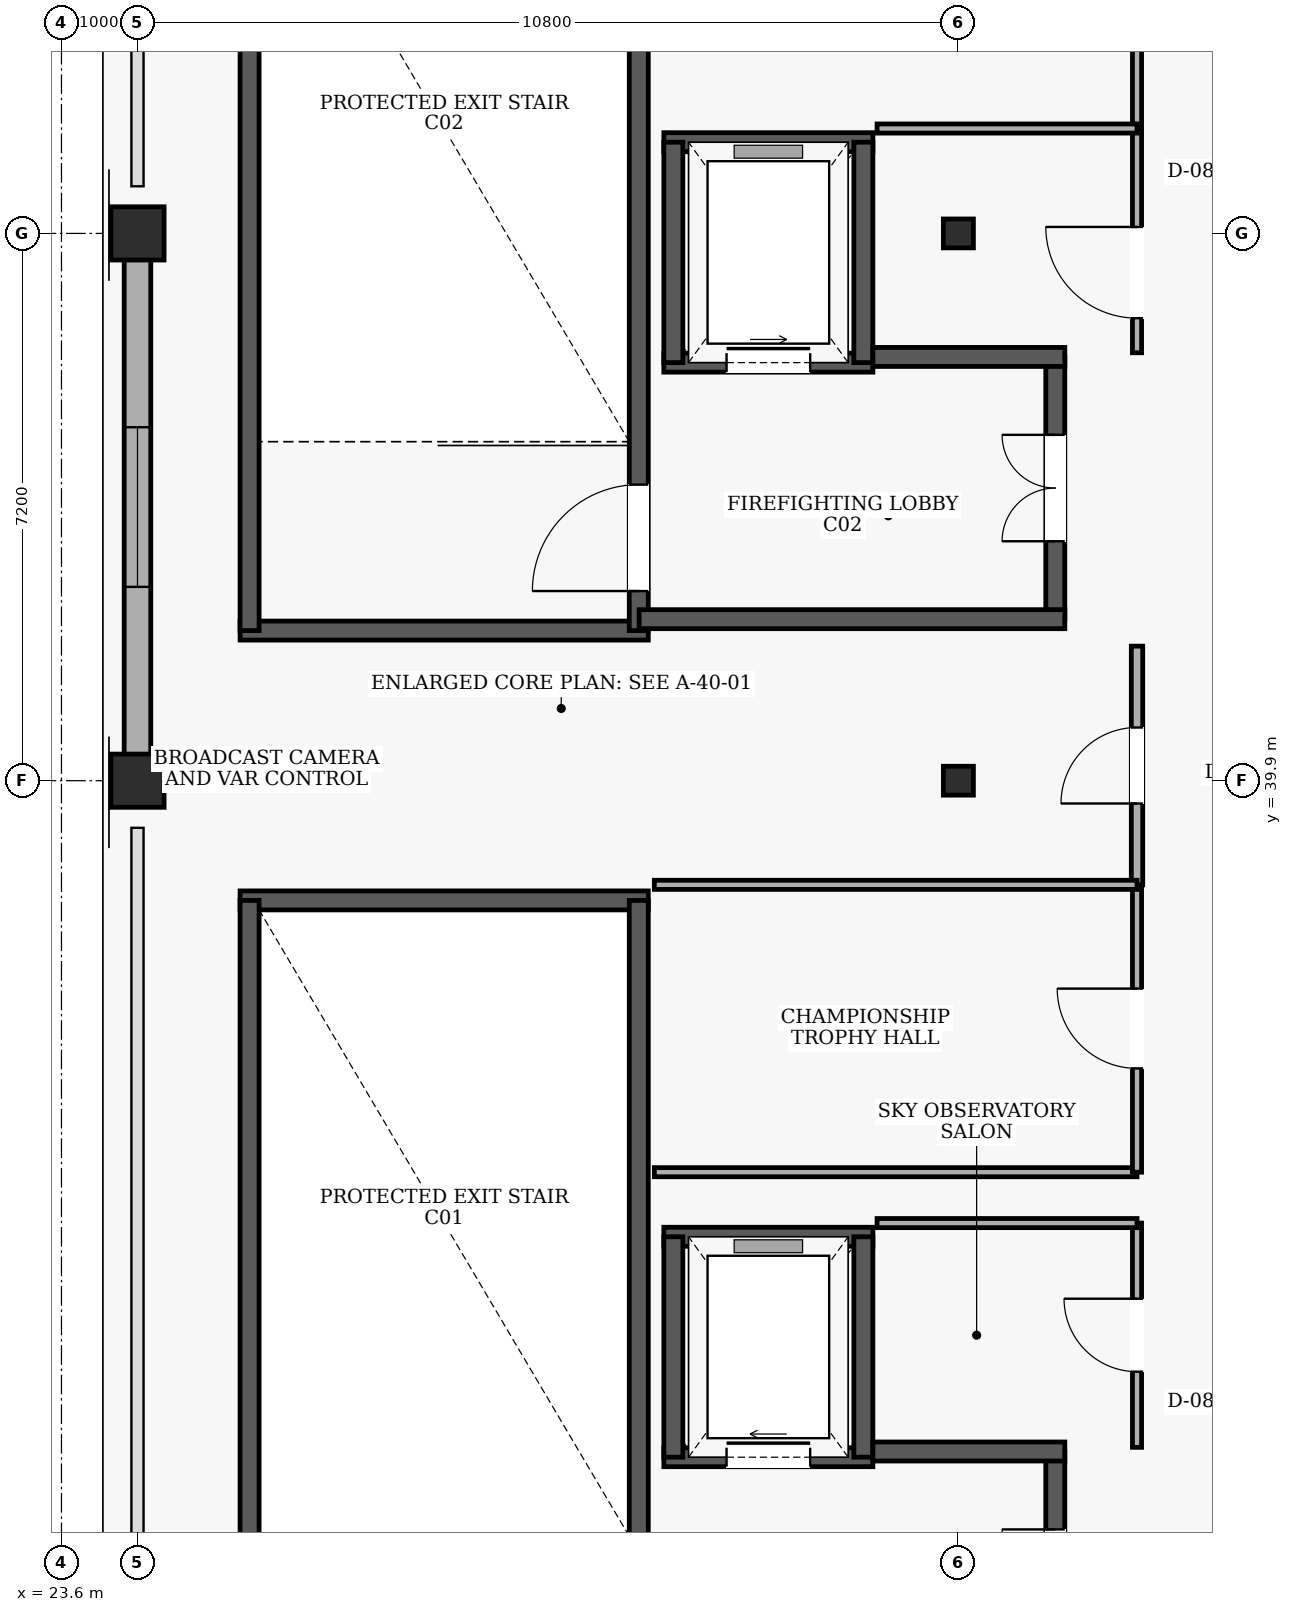
"""IFC4 building model, lengths in metres.
Left out: names, types, materials, properties, quantities, classifications, styles, units other than length and angle.
Written with IfcOpenShell. Run it as: python <this file> out.ifc"""

import sys

from ifc_helpers import new_model, si_unit, direction, frame, frame_2d, origin, origin_2d, place, context, subcontext, project, spatial, rectangle, i_section, extrude, element, fill, save


model = new_model("IFC4")
c1 = context("Model", 3, precision=1e-05, world=origin(), true_north=direction((0.0, 1.0)))
c2 = subcontext(c1, "Body", "Model", "MODEL_VIEW")
j1 = project(units=[si_unit("LENGTHUNIT", "METRE"), si_unit("PLANEANGLEUNIT", "RADIAN")], contexts=[c1])
p1 = place(None, origin())
s1 = spatial("IfcSite", under=j1, at=p1, CompositionType="ELEMENT")
p2 = place(p1, origin())
s2 = spatial("IfcBuilding", under=s1, at=p2, CompositionType="ELEMENT")
p3 = place(p2, frame((0.0, 0.0, 29.4)))
s3 = spatial("IfcBuildingStorey", under=s2, at=p3, CompositionType="ELEMENT", Elevation=29.4)
for number, where, z_axis, x_axis in (
    (1, (24.6, 39.9, 0.0), (0.0, 0.0, 1.0), (1.0, 0.0, 0.0)),
    (2, (24.6, 47.1, 0.0), (0.0, 0.0, 1.0), (1.0, 0.0, 0.0)),
):
    element("IfcColumn", number, at=place(p3, frame(where, z_axis=z_axis, x_axis=x_axis)), inside=s3, PredefinedType="COLUMN", context=c2, shape_type="SweptSolid", body=[
        extrude(rectangle(XDim=0.7, YDim=0.7, at=origin_2d()), origin(), (0.0, 0.0, 1.0), 4.8),
    ])
for number, where, z_axis, x_axis in (
    (3, (35.4, 39.9, 0.0), (0.0, 0.0, 1.0), (1.0, 0.0, 0.0)),
    (4, (35.4, 47.1, 0.0), (0.0, 0.0, 1.0), (1.0, 0.0, 0.0)),
):
    element("IfcColumn", number, at=place(p3, frame(where, z_axis=z_axis, x_axis=x_axis)), inside=s3, PredefinedType="COLUMN", context=c2, shape_type="SweptSolid", body=[
        extrude(i_section(OverallWidth=0.395, OverallDepth=0.38, WebThickness=0.019, FlangeThickness=0.03, at=origin_2d()), origin(), (0.0, 0.0, 1.0), 4.8),
    ])
p4 = place(p3, frame((24.6, 40.245, 0.0), z_axis=(0.0, 0.0, 1.0), x_axis=(0.0, 1.0, 0.0)))
e5 = element("IfcWall", 5, at=p4, inside=s3, PredefinedType="SOLIDWALL", context=c2, shape_type="SweptSolid", body=[
    extrude(rectangle(XDim=6.51, YDim=0.35, at=frame_2d((3.255, 0.0))), origin(), (0.0, 0.0, 1.0), 3.68),
])
p5 = place(p4, frame((2.205, 0.0, 0.9)))
e6 = element("IfcOpeningElement", 6, at=p5, cuts=e5, PredefinedType="OPENING", context=c2, shape_type="SweptSolid", body=[
    extrude(rectangle(XDim=2.1, YDim=1.8, at=frame_2d((1.05, 0.9))), frame((0.0, 0.185, 0.0), z_axis=(0.0, -1.0, 0.0), x_axis=(1.0, 0.0, 0.0)), (0.0, 0.0, 1.0), 0.37),
])
p6 = place(p3, frame((31.32, 38.325, 0.0), z_axis=(0.0, 0.0, 1.0), x_axis=(-1.0, 0.0, 0.0)))
e7 = element("IfcWall", 7, at=p6, inside=s3, PredefinedType="SHEAR", context=c2, shape_type="SweptSolid", body=[
    extrude(rectangle(XDim=5.37, YDim=0.25, at=frame_2d((2.685, 0.0))), origin(), (0.0, 0.0, 1.0), 4.5),
])
p7 = place(p3, frame((26.075, 27.475, 0.0), z_axis=(0.0, 0.0, 1.0), x_axis=(0.0, 1.0, 0.0)))
e8 = element("IfcWall", 8, at=p7, inside=s3, PredefinedType="SHEAR", context=c2, shape_type="SweptSolid", body=[
    extrude(rectangle(XDim=10.85, YDim=0.25, at=frame_2d((5.425, 0.0))), origin(), (0.0, 0.0, 1.0), 4.5),
])
p8 = place(p3, frame((31.195, 27.475, 0.0), z_axis=(0.0, 0.0, 1.0), x_axis=(0.0, 1.0, 0.0)))
e9 = element("IfcWall", 9, at=p8, inside=s3, PredefinedType="SHEAR", context=c2, shape_type="SweptSolid", body=[
    extrude(rectangle(XDim=10.85, YDim=0.25, at=frame_2d((5.425, 0.0))), origin(), (0.0, 0.0, 1.0), 4.5),
])
p9 = place(p8, frame((0.52, 0.0, 0.0)))
e10 = element("IfcOpeningElement", 10, at=p9, cuts=e9, PredefinedType="OPENING", context=c2, shape_type="SweptSolid", body=[
    extrude(rectangle(XDim=1.4, YDim=2.15, at=frame_2d((0.7, 1.075))), frame((0.0, 0.135, 0.0), z_axis=(0.0, -1.0, 0.0), x_axis=(1.0, 0.0, 0.0)), (0.0, 0.0, 1.0), 0.27),
])
p10 = place(p3, frame((25.95, 41.875, 0.0), z_axis=(0.0, 0.0, 1.0), x_axis=(1.0, 0.0, 0.0)))
e11 = element("IfcWall", 11, at=p10, inside=s3, PredefinedType="SHEAR", context=c2, shape_type="SweptSolid", body=[
    extrude(rectangle(XDim=5.37, YDim=0.25, at=frame_2d((2.685, 0.0))), origin(), (0.0, 0.0, 1.0), 4.5),
])
p11 = place(p3, frame((26.075, 41.875, 0.0), z_axis=(0.0, 0.0, 1.0), x_axis=(0.0, 1.0, 0.0)))
e12 = element("IfcWall", 12, at=p11, inside=s3, PredefinedType="SHEAR", context=c2, shape_type="SweptSolid", body=[
    extrude(rectangle(XDim=10.85, YDim=0.25, at=frame_2d((5.425, 0.0))), origin(), (0.0, 0.0, 1.0), 4.5),
])
p12 = place(p3, frame((31.195, 41.875, 0.0), z_axis=(0.0, 0.0, 1.0), x_axis=(0.0, 1.0, 0.0)))
e13 = element("IfcWall", 13, at=p12, inside=s3, PredefinedType="SHEAR", context=c2, shape_type="SweptSolid", body=[
    extrude(rectangle(XDim=10.85, YDim=0.25, at=frame_2d((5.425, 0.0))), origin(), (0.0, 0.0, 1.0), 4.5),
])
p13 = place(p12, frame((0.52, 0.0, 0.0)))
e14 = element("IfcOpeningElement", 14, at=p13, cuts=e13, PredefinedType="OPENING", context=c2, shape_type="SweptSolid", body=[
    extrude(rectangle(XDim=1.4, YDim=2.15, at=frame_2d((0.7, 1.075))), frame((0.0, 0.135, 0.0), z_axis=(0.0, -1.0, 0.0), x_axis=(1.0, 0.0, 0.0)), (0.0, 0.0, 1.0), 0.27),
])
p14 = place(p3, frame((31.525, 31.0, 0.0), z_axis=(0.0, 0.0, 1.0), x_axis=(1.0, 0.0, 0.0)))
e15 = element("IfcWall", 15, at=p14, inside=s3, PredefinedType="SHEAR", context=c2, shape_type="SweptSolid", body=[
    extrude(rectangle(XDim=2.75, YDim=0.25, at=frame_2d((1.375, 0.0))), origin(), (0.0, 0.0, 1.0), 4.5),
])
p15 = place(p14, frame((0.825, 0.0, 0.0)))
e16 = element("IfcOpeningElement", 16, at=p15, cuts=e15, PredefinedType="OPENING", context=c2, shape_type="SweptSolid", body=[
    extrude(rectangle(XDim=1.1, YDim=2.15, at=frame_2d((0.55, 1.075))), frame((0.0, 0.135, 0.0), z_axis=(0.0, -1.0, 0.0), x_axis=(1.0, 0.0, 0.0)), (0.0, 0.0, 1.0), 0.27),
])
p16 = place(p3, frame((34.275, 33.9, 0.0), z_axis=(0.0, 0.0, 1.0), x_axis=(-1.0, 0.0, 0.0)))
e17 = element("IfcWall", 17, at=p16, inside=s3, PredefinedType="SHEAR", context=c2, shape_type="SweptSolid", body=[
    extrude(rectangle(XDim=2.75, YDim=0.25, at=frame_2d((1.375, 0.0))), origin(), (0.0, 0.0, 1.0), 4.5),
])
for number, where, z_axis, x_axis in (
    (18, (31.65, 33.9, 0.0), (0.0, 0.0, 1.0), (0.0, -1.0, 0.0)),
    (19, (34.15, 31.0, 0.0), (0.0, 0.0, 1.0), (0.0, 1.0, 0.0)),
):
    element("IfcWall", number, at=place(p3, frame(where, z_axis=z_axis, x_axis=x_axis)), inside=s3, PredefinedType="SHEAR", context=c2, shape_type="SweptSolid", body=[
        extrude(rectangle(XDim=2.9, YDim=0.25, at=frame_2d((1.45, 0.0))), origin(), (0.0, 0.0, 1.0), 4.5),
    ])
p17 = place(p3, frame((36.675, 27.625, 0.0), z_axis=(0.0, 0.0, 1.0), x_axis=(0.0, 1.0, 0.0)))
e20 = element("IfcWall", 20, at=p17, inside=s3, PredefinedType="SHEAR", context=c2, shape_type="SweptSolid", body=[
    extrude(rectangle(XDim=3.45, YDim=0.25, at=frame_2d((1.725, 0.0))), origin(), (0.0, 0.0, 1.0), 4.5),
])
p18 = place(p17, frame((1.025, 0.0, 0.0)))
e21 = element("IfcOpeningElement", 21, at=p18, cuts=e20, PredefinedType="OPENING", context=c2, shape_type="SweptSolid", body=[
    extrude(rectangle(XDim=1.4, YDim=2.15, at=frame_2d((0.7, 1.075))), frame((0.0, 0.135, 0.0), z_axis=(0.0, -1.0, 0.0), x_axis=(1.0, 0.0, 0.0)), (0.0, 0.0, 1.0), 0.27),
])
p19 = place(p3, frame((34.275, 31.075, 0.0), z_axis=(0.0, 0.0, 1.0), x_axis=(1.0, 0.0, 0.0)))
e22 = element("IfcWall", 22, at=p19, inside=s3, PredefinedType="SHEAR", context=c2, shape_type="SweptSolid", body=[
    extrude(rectangle(XDim=2.525, YDim=0.25, at=frame_2d((1.263, 0.0))), origin(), (0.0, 0.0, 1.0), 4.5),
])
p20 = place(p3, frame((31.525, 45.4, 0.0), z_axis=(0.0, 0.0, 1.0), x_axis=(1.0, 0.0, 0.0)))
e23 = element("IfcWall", 23, at=p20, inside=s3, PredefinedType="SHEAR", context=c2, shape_type="SweptSolid", body=[
    extrude(rectangle(XDim=2.75, YDim=0.25, at=frame_2d((1.375, 0.0))), origin(), (0.0, 0.0, 1.0), 4.5),
])
p21 = place(p20, frame((0.825, 0.0, 0.0)))
e24 = element("IfcOpeningElement", 24, at=p21, cuts=e23, PredefinedType="OPENING", context=c2, shape_type="SweptSolid", body=[
    extrude(rectangle(XDim=1.1, YDim=2.15, at=frame_2d((0.55, 1.075))), frame((0.0, 0.135, 0.0), z_axis=(0.0, -1.0, 0.0), x_axis=(1.0, 0.0, 0.0)), (0.0, 0.0, 1.0), 0.27),
])
p22 = place(p3, frame((34.275, 48.3, 0.0), z_axis=(0.0, 0.0, 1.0), x_axis=(-1.0, 0.0, 0.0)))
e25 = element("IfcWall", 25, at=p22, inside=s3, PredefinedType="SHEAR", context=c2, shape_type="SweptSolid", body=[
    extrude(rectangle(XDim=2.75, YDim=0.25, at=frame_2d((1.375, 0.0))), origin(), (0.0, 0.0, 1.0), 4.5),
])
for number, where, z_axis, x_axis in (
    (26, (31.65, 48.3, 0.0), (0.0, 0.0, 1.0), (0.0, -1.0, 0.0)),
    (27, (34.15, 45.4, 0.0), (0.0, 0.0, 1.0), (0.0, 1.0, 0.0)),
):
    element("IfcWall", number, at=place(p3, frame(where, z_axis=z_axis, x_axis=x_axis)), inside=s3, PredefinedType="SHEAR", context=c2, shape_type="SweptSolid", body=[
        extrude(rectangle(XDim=2.9, YDim=0.25, at=frame_2d((1.45, 0.0))), origin(), (0.0, 0.0, 1.0), 4.5),
    ])
p23 = place(p3, frame((36.675, 42.025, 0.0), z_axis=(0.0, 0.0, 1.0), x_axis=(0.0, 1.0, 0.0)))
e28 = element("IfcWall", 28, at=p23, inside=s3, PredefinedType="SHEAR", context=c2, shape_type="SweptSolid", body=[
    extrude(rectangle(XDim=3.45, YDim=0.25, at=frame_2d((1.725, 0.0))), origin(), (0.0, 0.0, 1.0), 4.5),
])
p24 = place(p23, frame((1.025, 0.0, 0.0)))
e29 = element("IfcOpeningElement", 29, at=p24, cuts=e28, PredefinedType="OPENING", context=c2, shape_type="SweptSolid", body=[
    extrude(rectangle(XDim=1.4, YDim=2.15, at=frame_2d((0.7, 1.075))), frame((0.0, 0.135, 0.0), z_axis=(0.0, -1.0, 0.0), x_axis=(1.0, 0.0, 0.0)), (0.0, 0.0, 1.0), 0.27),
])
p25 = place(p3, frame((34.275, 45.475, 0.0), z_axis=(0.0, 0.0, 1.0), x_axis=(1.0, 0.0, 0.0)))
e30 = element("IfcWall", 30, at=p25, inside=s3, PredefinedType="SHEAR", context=c2, shape_type="SweptSolid", body=[
    extrude(rectangle(XDim=2.525, YDim=0.25, at=frame_2d((1.263, 0.0))), origin(), (0.0, 0.0, 1.0), 4.5),
])
p26 = place(p3, frame((31.2, 42.025, 0.0), z_axis=(0.0, 0.0, 1.0), x_axis=(1.0, 0.0, 0.0)))
e31 = element("IfcWall", 31, at=p26, inside=s3, PredefinedType="SHEAR", context=c2, shape_type="SweptSolid", body=[
    extrude(rectangle(XDim=5.6, YDim=0.25, at=frame_2d((2.8, 0.0))), origin(), (0.0, 0.0, 1.0), 4.5),
])
p27 = place(p3, frame((37.75, 31.13, 0.0), z_axis=(0.0, 0.0, 1.0), x_axis=(0.0, 1.0, 0.0)))
e32 = element("IfcWall", 32, at=p27, inside=s3, PredefinedType="PARTITIONING", context=c2, shape_type="SweptSolid", body=[
    extrude(rectangle(XDim=2.95, YDim=0.12, at=frame_2d((1.475, 0.0))), origin(), (0.0, 0.0, 1.0), 4.5),
])
p28 = place(p27, frame((0.995, 0.0, 0.0)))
e33 = element("IfcOpeningElement", 33, at=p28, cuts=e32, PredefinedType="OPENING", context=c2, shape_type="SweptSolid", body=[
    extrude(rectangle(XDim=0.96, YDim=2.1, at=frame_2d((0.48, 1.05))), frame((0.0, 0.07, 0.0), z_axis=(0.0, -1.0, 0.0), x_axis=(1.0, 0.0, 0.0)), (0.0, 0.0, 1.0), 0.14),
])
p29 = place(p3, frame((37.75, 34.08, 0.0), z_axis=(0.0, 0.0, 1.0), x_axis=(-1.0, 0.0, 0.0)))
e34 = element("IfcWall", 34, at=p29, inside=s3, PredefinedType="PARTITIONING", context=c2, shape_type="SweptSolid", body=[
    extrude(rectangle(XDim=3.42, YDim=0.12, at=frame_2d((1.71, 0.0))), origin(), (0.0, 0.0, 1.0), 4.5),
])
p30 = place(p3, frame((37.75, 38.53, 0.0), z_axis=(0.0, 0.0, 1.0), x_axis=(0.0, 1.0, 0.0)))
e35 = element("IfcWall", 35, at=p30, inside=s3, PredefinedType="PARTITIONING", context=c2, shape_type="SweptSolid", body=[
    extrude(rectangle(XDim=3.14, YDim=0.15, at=frame_2d((1.57, 0.0))), origin(), (0.0, 0.0, 1.0), 4.5),
])
p31 = place(p30, frame((1.07, 0.0, 0.0)))
e36 = element("IfcOpeningElement", 36, at=p31, cuts=e35, PredefinedType="OPENING", context=c2, shape_type="SweptSolid", body=[
    extrude(rectangle(XDim=1.0, YDim=2.1, at=frame_2d((0.5, 1.05))), frame((0.0, 0.085, 0.0), z_axis=(0.0, -1.0, 0.0), x_axis=(1.0, 0.0, 0.0)), (0.0, 0.0, 1.0), 0.17),
])
p32 = place(p3, frame((31.4, 34.75, 0.0), z_axis=(0.0, 0.0, 1.0), x_axis=(1.0, 0.0, 0.0)))
e37 = element("IfcWall", 37, at=p32, inside=s3, PredefinedType="PARTITIONING", context=c2, shape_type="SweptSolid", body=[
    extrude(rectangle(XDim=6.35, YDim=0.12, at=frame_2d((3.175, 0.0))), origin(), (0.0, 0.0, 1.0), 4.5),
])
p33 = place(p3, frame((37.75, 34.75, 0.0), z_axis=(0.0, 0.0, 1.0), x_axis=(0.0, 1.0, 0.0)))
e38 = element("IfcWall", 38, at=p33, inside=s3, PredefinedType="PARTITIONING", context=c2, shape_type="SweptSolid", body=[
    extrude(rectangle(XDim=3.781, YDim=0.12, at=frame_2d((1.89, 0.0))), origin(), (0.0, 0.0, 1.0), 4.5),
])
p34 = place(p33, frame((1.365, 0.0, 0.0)))
e39 = element("IfcOpeningElement", 39, at=p34, cuts=e38, PredefinedType="OPENING", context=c2, shape_type="SweptSolid", body=[
    extrude(rectangle(XDim=1.05, YDim=2.15, at=frame_2d((0.525, 1.075))), frame((0.0, 0.07, 0.0), z_axis=(0.0, -1.0, 0.0), x_axis=(1.0, 0.0, 0.0)), (0.0, 0.0, 1.0), 0.14),
])
p35 = place(p3, frame((37.75, 38.53, 0.0), z_axis=(0.0, 0.0, 1.0), x_axis=(-1.0, 0.0, 0.0)))
e40 = element("IfcWall", 40, at=p35, inside=s3, PredefinedType="PARTITIONING", context=c2, shape_type="SweptSolid", body=[
    extrude(rectangle(XDim=6.35, YDim=0.12, at=frame_2d((3.175, 0.0))), origin(), (0.0, 0.0, 1.0), 4.5),
])
p36 = place(p3, frame((37.75, 48.48, 0.0), z_axis=(0.0, 0.0, 1.0), x_axis=(0.0, 1.0, 0.0)))
e41 = element("IfcWall", 41, at=p36, inside=s3, PredefinedType="PARTITIONING", context=c2, shape_type="SweptSolid", body=[
    extrude(rectangle(XDim=4.45, YDim=0.12, at=frame_2d((2.225, 0.0))), origin(), (0.0, 0.0, 1.0), 4.5),
])
p37 = place(p36, frame((1.665, 0.0, 0.0)))
e42 = element("IfcOpeningElement", 42, at=p37, cuts=e41, PredefinedType="OPENING", context=c2, shape_type="SweptSolid", body=[
    extrude(rectangle(XDim=1.12, YDim=2.15, at=frame_2d((0.56, 1.075))), frame((0.0, 0.07, 0.0), z_axis=(0.0, -1.0, 0.0), x_axis=(1.0, 0.0, 0.0)), (0.0, 0.0, 1.0), 0.14),
])
p38 = place(p3, frame((37.75, 45.53, 0.0), z_axis=(0.0, 0.0, 1.0), x_axis=(0.0, 1.0, 0.0)))
e43 = element("IfcWall", 43, at=p38, inside=s3, PredefinedType="PARTITIONING", context=c2, shape_type="SweptSolid", body=[
    extrude(rectangle(XDim=2.95, YDim=0.12, at=frame_2d((1.475, 0.0))), origin(), (0.0, 0.0, 1.0), 4.5),
])
p39 = place(p38, frame((0.455, 0.0, 0.0)))
e44 = element("IfcOpeningElement", 44, at=p39, cuts=e43, PredefinedType="OPENING", context=c2, shape_type="SweptSolid", body=[
    extrude(rectangle(XDim=1.2, YDim=2.15, at=frame_2d((0.6, 1.075))), frame((0.0, 0.07, 0.0), z_axis=(0.0, -1.0, 0.0), x_axis=(1.0, 0.0, 0.0)), (0.0, 0.0, 1.0), 0.14),
])
p40 = place(p3, frame((37.75, 48.48, 0.0), z_axis=(0.0, 0.0, 1.0), x_axis=(-1.0, 0.0, 0.0)))
e45 = element("IfcWall", 45, at=p40, inside=s3, PredefinedType="PARTITIONING", context=c2, shape_type="SweptSolid", body=[
    extrude(rectangle(XDim=3.42, YDim=0.12, at=frame_2d((1.71, 0.0))), origin(), (0.0, 0.0, 1.0), 4.5),
])
p41 = place(p5, origin())
e46 = element("IfcWindow", 46, at=p41, inside=s3, PartitioningType="SINGLE_PANEL", PredefinedType="WINDOW", context=c2, shape_type="SweptSolid", body=[
    extrude(rectangle(XDim=2.1, YDim=1.8, at=frame_2d((1.05, 0.9))), frame((0.0, 0.03, 0.0), z_axis=(0.0, -1.0, 0.0), x_axis=(1.0, 0.0, 0.0)), (0.0, 0.0, 1.0), 0.06),
])
fill(e6, e46)
p42 = place(p13, origin())
e47 = element("IfcDoor", 47, at=p42, inside=s3, OperationType="SINGLE_SWING_LEFT", PredefinedType="DOOR", context=c2, shape_type="SweptSolid", body=[
    extrude(rectangle(XDim=1.4, YDim=2.15, at=frame_2d((0.7, 1.075))), frame((0.0, 0.025, 0.0), z_axis=(0.0, -1.0, 0.0), x_axis=(1.0, 0.0, 0.0)), (0.0, 0.0, 1.0), 0.05),
])
fill(e14, e47)
p43 = place(p15, origin())
e48 = element("IfcDoor", 48, at=p43, inside=s3, OperationType="SLIDING_TO_RIGHT", PredefinedType="DOOR", context=c2, shape_type="SweptSolid", body=[
    extrude(rectangle(XDim=1.1, YDim=2.15, at=frame_2d((0.55, 1.075))), frame((0.0, 0.025, 0.0), z_axis=(0.0, -1.0, 0.0), x_axis=(1.0, 0.0, 0.0)), (0.0, 0.0, 1.0), 0.05),
])
fill(e16, e48)
p44 = place(p18, origin())
e49 = element("IfcDoor", 49, at=p44, inside=s3, OperationType="DOUBLE_DOOR_SINGLE_SWING", PredefinedType="DOOR", context=c2, shape_type="SweptSolid", body=[
    extrude(rectangle(XDim=1.4, YDim=2.15, at=frame_2d((0.7, 1.075))), frame((0.0, 0.025, 0.0), z_axis=(0.0, -1.0, 0.0), x_axis=(1.0, 0.0, 0.0)), (0.0, 0.0, 1.0), 0.05),
])
fill(e21, e49)
p45 = place(p21, origin())
e50 = element("IfcDoor", 50, at=p45, inside=s3, OperationType="SLIDING_TO_LEFT", PredefinedType="DOOR", context=c2, shape_type="SweptSolid", body=[
    extrude(rectangle(XDim=1.1, YDim=2.15, at=frame_2d((0.55, 1.075))), frame((0.0, 0.025, 0.0), z_axis=(0.0, -1.0, 0.0), x_axis=(1.0, 0.0, 0.0)), (0.0, 0.0, 1.0), 0.05),
])
fill(e24, e50)
p46 = place(p24, origin())
e51 = element("IfcDoor", 51, at=p46, inside=s3, OperationType="DOUBLE_DOOR_SINGLE_SWING", PredefinedType="DOOR", context=c2, shape_type="SweptSolid", body=[
    extrude(rectangle(XDim=1.4, YDim=2.15, at=frame_2d((0.7, 1.075))), frame((0.0, 0.025, 0.0), z_axis=(0.0, -1.0, 0.0), x_axis=(1.0, 0.0, 0.0)), (0.0, 0.0, 1.0), 0.05),
])
fill(e29, e51)
p47 = place(p28, origin())
e52 = element("IfcDoor", 52, at=p47, inside=s3, OperationType="SINGLE_SWING_RIGHT", PredefinedType="DOOR", context=c2, shape_type="SweptSolid", body=[
    extrude(rectangle(XDim=0.96, YDim=2.1, at=frame_2d((0.48, 1.05))), frame((0.0, 0.025, 0.0), z_axis=(0.0, -1.0, 0.0), x_axis=(1.0, 0.0, 0.0)), (0.0, 0.0, 1.0), 0.05),
])
fill(e33, e52)
p48 = place(p31, origin())
e53 = element("IfcDoor", 53, at=p48, inside=s3, OperationType="SINGLE_SWING_LEFT", PredefinedType="DOOR", context=c2, shape_type="SweptSolid", body=[
    extrude(rectangle(XDim=1.0, YDim=2.1, at=frame_2d((0.5, 1.05))), frame((0.0, 0.025, 0.0), z_axis=(0.0, -1.0, 0.0), x_axis=(1.0, 0.0, 0.0)), (0.0, 0.0, 1.0), 0.05),
])
fill(e36, e53)
p49 = place(p34, origin())
e54 = element("IfcDoor", 54, at=p49, inside=s3, OperationType="SINGLE_SWING_RIGHT", PredefinedType="DOOR", context=c2, shape_type="SweptSolid", body=[
    extrude(rectangle(XDim=1.05, YDim=2.15, at=frame_2d((0.525, 1.075))), frame((0.0, 0.025, 0.0), z_axis=(0.0, -1.0, 0.0), x_axis=(1.0, 0.0, 0.0)), (0.0, 0.0, 1.0), 0.05),
])
fill(e39, e54)
p50 = place(p39, origin())
e55 = element("IfcDoor", 55, at=p50, inside=s3, OperationType="SINGLE_SWING_RIGHT", PredefinedType="DOOR", context=c2, shape_type="SweptSolid", body=[
    extrude(rectangle(XDim=1.2, YDim=2.15, at=frame_2d((0.6, 1.075))), frame((0.0, 0.025, 0.0), z_axis=(0.0, -1.0, 0.0), x_axis=(1.0, 0.0, 0.0)), (0.0, 0.0, 1.0), 0.05),
])
fill(e44, e55)
save(model, sys.argv[1])
